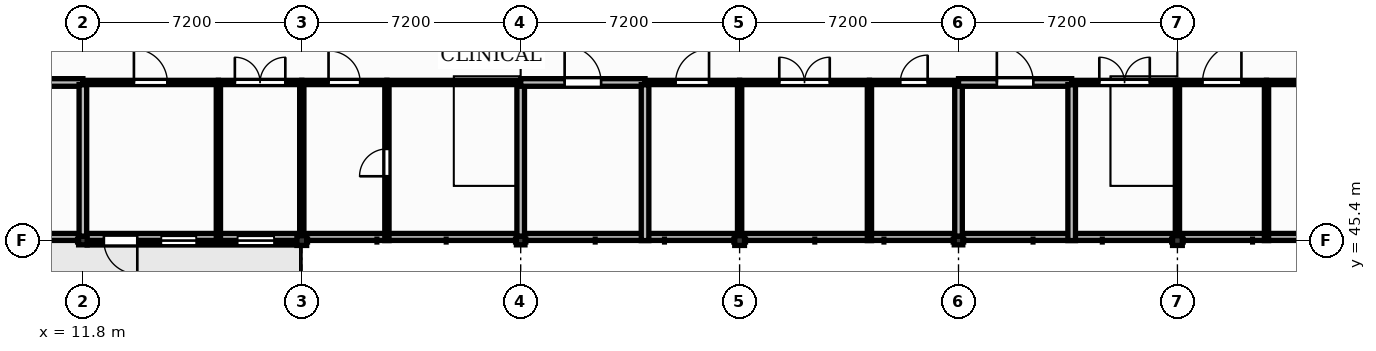
"""IFC4 building model, lengths in metres.
Left out: names, types, materials, properties, quantities, classifications, styles, units other than length and angle.
Written with IfcOpenShell. Run it as: python <this file> out.ifc"""

import sys

from ifc_helpers import new_model, si_unit, direction, frame, frame_2d, origin, origin_2d, place, context, subcontext, project, spatial, polyline, rectangle, outline, extrude, element, fill, save


model = new_model("IFC4")
c1 = context("Model", 3, precision=1e-05, world=origin(), true_north=direction((0.0, 1.0)))
c2 = subcontext(c1, "Body", "Model", "MODEL_VIEW")
j1 = project(units=[si_unit("LENGTHUNIT", "METRE"), si_unit("PLANEANGLEUNIT", "RADIAN")], contexts=[c1])
p1 = place(None, origin())
s1 = spatial("IfcSite", under=j1, at=p1, CompositionType="ELEMENT")
p2 = place(p1, origin())
s2 = spatial("IfcBuilding", under=s1, at=p2, CompositionType="ELEMENT")
p3 = place(p2, frame((0.0, 0.0, 17.4)))
s3 = spatial("IfcBuildingStorey", under=s2, at=p3, CompositionType="ELEMENT", Elevation=17.4)
p4 = place(p3, frame((11.8, 45.4, 0.0), z_axis=(0.0, 0.0, 1.0), x_axis=(1.0, 0.0, 0.0)))
e1 = element("IfcColumn", 1, at=p4, inside=s3, PredefinedType="COLUMN", context=c2, shape_type="SweptSolid", body=[
    extrude(rectangle(XDim=0.28, YDim=0.28, at=origin_2d()), origin(), (0.0, 0.0, 1.0), 3.95),
])
p5 = place(p3, frame((19.0, 45.4, 0.0), z_axis=(0.0, 0.0, 1.0), x_axis=(1.0, 0.0, 0.0)))
e2 = element("IfcColumn", 2, at=p5, inside=s3, PredefinedType="COLUMN", context=c2, shape_type="SweptSolid", body=[
    extrude(rectangle(XDim=0.32, YDim=0.32, at=origin_2d()), origin(), (0.0, 0.0, 1.0), 3.95),
])
p6 = place(p3, frame((26.2, 45.4, 0.0), z_axis=(0.0, 0.0, 1.0), x_axis=(1.0, 0.0, 0.0)))
e3 = element("IfcColumn", 3, at=p6, inside=s3, PredefinedType="COLUMN", context=c2, shape_type="SweptSolid", body=[
    extrude(rectangle(XDim=0.28, YDim=0.28, at=origin_2d()), origin(), (0.0, 0.0, 1.0), 3.95),
])
p7 = place(p3, frame((33.4, 45.4, 0.0), z_axis=(0.0, 0.0, 1.0), x_axis=(1.0, 0.0, 0.0)))
e4 = element("IfcColumn", 4, at=p7, inside=s3, PredefinedType="COLUMN", context=c2, shape_type="SweptSolid", body=[
    extrude(rectangle(XDim=0.32, YDim=0.32, at=origin_2d()), origin(), (0.0, 0.0, 1.0), 3.95),
])
p8 = place(p3, frame((40.6, 45.4, 0.0), z_axis=(0.0, 0.0, 1.0), x_axis=(1.0, 0.0, 0.0)))
e5 = element("IfcColumn", 5, at=p8, inside=s3, PredefinedType="COLUMN", context=c2, shape_type="SweptSolid", body=[
    extrude(rectangle(XDim=0.28, YDim=0.28, at=origin_2d()), origin(), (0.0, 0.0, 1.0), 3.95),
])
p9 = place(p3, frame((47.8, 45.4, 0.0), z_axis=(0.0, 0.0, 1.0), x_axis=(1.0, 0.0, 0.0)))
e6 = element("IfcColumn", 6, at=p9, inside=s3, PredefinedType="COLUMN", context=c2, shape_type="SweptSolid", body=[
    extrude(rectangle(XDim=0.32, YDim=0.32, at=origin_2d()), origin(), (0.0, 0.0, 1.0), 3.95),
])
p10 = place(p3, frame((11.94, 45.4, 0.0), z_axis=(0.0, 0.0, 1.0), x_axis=(1.0, 0.0, 0.0)))
e7 = element("IfcWall", 7, at=p10, inside=s3, PredefinedType="SOLIDWALL", context=c2, shape_type="SweptSolid", body=[
    extrude(rectangle(XDim=6.9, YDim=0.29, at=frame_2d((3.45, 0.0))), origin(), (0.0, 0.0, 1.0), 3.49),
])
p11 = place(p10, frame((0.55, 0.0, 0.0)))
e8 = element("IfcOpeningElement", 8, at=p11, cuts=e7, PredefinedType="OPENING", context=c2, shape_type="SweptSolid", body=[
    extrude(rectangle(XDim=1.1, YDim=2.25, at=frame_2d((0.55, 1.125))), frame((0.0, 0.155, 0.0), z_axis=(0.0, -1.0, 0.0), x_axis=(1.0, 0.0, 0.0)), (0.0, 0.0, 1.0), 0.31),
])
p12 = place(p10, frame((2.438, 0.0, 1.5)))
e9 = element("IfcOpeningElement", 9, at=p12, cuts=e7, PredefinedType="OPENING", context=c2, shape_type="SweptSolid", body=[
    extrude(rectangle(XDim=1.15, YDim=1.25, at=frame_2d((0.575, 0.625))), frame((0.0, 0.155, 0.0), z_axis=(0.0, -1.0, 0.0), x_axis=(1.0, 0.0, 0.0)), (0.0, 0.0, 1.0), 0.31),
])
p13 = place(p10, frame((4.948, 0.0, 1.0)))
e10 = element("IfcOpeningElement", 10, at=p13, cuts=e7, PredefinedType="OPENING", context=c2, shape_type="SweptSolid", body=[
    extrude(rectangle(XDim=1.2, YDim=1.95, at=frame_2d((0.6, 0.975))), frame((0.0, 0.155, 0.0), z_axis=(0.0, -1.0, 0.0), x_axis=(1.0, 0.0, 0.0)), (0.0, 0.0, 1.0), 0.31),
])
p14 = place(p3, frame((4.6, 45.52, 4.2), z_axis=(0.0, 0.0, 1.0), x_axis=(1.0, 0.0, 0.0)))
e11 = element("IfcWall", 11, at=p14, inside=s3, PredefinedType="PARAPET", context=c2, shape_type="SweptSolid", body=[
    extrude(outline(polyline([(0.0, 0.0), (50.4, 0.0), (50.4, 0.6), (39.312, 0.85), (39.312, 0.6), (32.256, 1.1), (32.256, 0.85), (18.144, 1.1), (18.144, 0.85), (11.088, 0.85), (11.088, 0.6), (0.0, 0.6), (0.0, 0.0)])), frame((0.0, 0.115, 0.0), z_axis=(0.0, -1.0, 0.0), x_axis=(1.0, 0.0, 0.0)), (0.0, 0.0, 1.0), 0.23),
])
p15 = place(p3, frame((7.343, 50.6, 0.0), z_axis=(0.0, 0.0, 1.0), x_axis=(1.0, 0.0, 0.0)))
e12 = element("IfcWall", 12, at=p15, inside=s3, PredefinedType="SOLIDWALL", context=c2, shape_type="SweptSolid", body=[
    extrude(rectangle(XDim=4.457, YDim=0.25, at=frame_2d((2.229, 0.0))), origin(), (0.0, 0.0, 1.0), 3.93),
])
p16 = place(p15, frame((1.628, 0.0, 0.0)))
e13 = element("IfcOpeningElement", 13, at=p16, cuts=e12, PredefinedType="OPENING", context=c2, shape_type="SweptSolid", body=[
    extrude(rectangle(XDim=1.2, YDim=2.15, at=frame_2d((0.6, 1.075))), frame((0.0, 0.135, 0.0), z_axis=(0.0, -1.0, 0.0), x_axis=(1.0, 0.0, 0.0)), (0.0, 0.0, 1.0), 0.27),
])
p17 = place(p3, frame((11.8, 45.54, 0.0), z_axis=(0.0, 0.0, 1.0), x_axis=(0.0, 1.0, 0.0)))
e14 = element("IfcWall", 14, at=p17, inside=s3, PredefinedType="SOLIDWALL", context=c2, shape_type="SweptSolid", body=[
    extrude(rectangle(XDim=4.99, YDim=0.25, at=frame_2d((2.495, 0.0))), origin(), (0.0, 0.0, 1.0), 3.49),
])
p18 = place(p3, frame((11.8, 50.6, 0.0), z_axis=(0.0, 0.0, 1.0), x_axis=(1.0, 0.0, 0.0)))
e15 = element("IfcWall", 15, at=p18, inside=s3, PredefinedType="PARTITIONING", context=c2, shape_type="SweptSolid", body=[
    extrude(rectangle(XDim=4.457, YDim=0.14, at=frame_2d((2.229, 0.0))), origin(), (0.0, 0.0, 1.0), 3.93),
])
p19 = place(p18, frame((1.678, 0.0, 0.0)))
e16 = element("IfcOpeningElement", 16, at=p19, cuts=e15, PredefinedType="OPENING", context=c2, shape_type="SweptSolid", body=[
    extrude(rectangle(XDim=1.1, YDim=2.1, at=frame_2d((0.55, 1.05))), frame((0.0, 0.08, 0.0), z_axis=(0.0, -1.0, 0.0), x_axis=(1.0, 0.0, 0.0)), (0.0, 0.0, 1.0), 0.16),
])
p20 = place(p3, frame((16.257, 45.4, 0.0), z_axis=(0.0, 0.0, 1.0), x_axis=(0.0, 1.0, 0.0)))
e17 = element("IfcWall", 17, at=p20, inside=s3, PredefinedType="PARTITIONING", context=c2, shape_type="SweptSolid", body=[
    extrude(rectangle(XDim=5.13, YDim=0.14, at=frame_2d((2.565, 0.0))), origin(), (0.0, 0.0, 1.0), 3.93),
])
p21 = place(p3, frame((16.257, 50.6, 0.0), z_axis=(0.0, 0.0, 1.0), x_axis=(1.0, 0.0, 0.0)))
e18 = element("IfcWall", 18, at=p21, inside=s3, PredefinedType="PARTITIONING", context=c2, shape_type="SweptSolid", body=[
    extrude(rectangle(XDim=2.743, YDim=0.14, at=frame_2d((1.372, 0.0))), origin(), (0.0, 0.0, 1.0), 3.93),
])
p22 = place(p21, frame((0.542, 0.0, 0.0)))
e19 = element("IfcOpeningElement", 19, at=p22, cuts=e18, PredefinedType="OPENING", context=c2, shape_type="SweptSolid", body=[
    extrude(rectangle(XDim=1.66, YDim=2.3, at=frame_2d((0.83, 1.15))), frame((0.0, 0.08, 0.0), z_axis=(0.0, -1.0, 0.0), x_axis=(1.0, 0.0, 0.0)), (0.0, 0.0, 1.0), 0.16),
])
p23 = place(p3, frame((19.0, 45.56, 0.0), z_axis=(0.0, 0.0, 1.0), x_axis=(0.0, 1.0, 0.0)))
e20 = element("IfcWall", 20, at=p23, inside=s3, PredefinedType="PARTITIONING", context=c2, shape_type="SweptSolid", body=[
    extrude(rectangle(XDim=4.97, YDim=0.14, at=frame_2d((2.485, 0.0))), origin(), (0.0, 0.0, 1.0), 3.49),
])
p24 = place(p3, frame((19.0, 50.6, 0.0), z_axis=(0.0, 0.0, 1.0), x_axis=(1.0, 0.0, 0.0)))
e21 = element("IfcWall", 21, at=p24, inside=s3, PredefinedType="PARTITIONING", context=c2, shape_type="SweptSolid", body=[
    extrude(rectangle(XDim=2.8, YDim=0.14, at=frame_2d((1.4, 0.0))), origin(), (0.0, 0.0, 1.0), 3.93),
])
p25 = place(p24, frame((0.88, 0.0, 0.0)))
e22 = element("IfcOpeningElement", 22, at=p25, cuts=e21, PredefinedType="OPENING", context=c2, shape_type="SweptSolid", body=[
    extrude(rectangle(XDim=1.04, YDim=2.1, at=frame_2d((0.52, 1.05))), frame((0.0, 0.08, 0.0), z_axis=(0.0, -1.0, 0.0), x_axis=(1.0, 0.0, 0.0)), (0.0, 0.0, 1.0), 0.16),
])
p26 = place(p3, frame((21.8, 45.4, 0.0), z_axis=(0.0, 0.0, 1.0), x_axis=(0.0, 1.0, 0.0)))
e23 = element("IfcWall", 23, at=p26, inside=s3, PredefinedType="PARTITIONING", context=c2, shape_type="SweptSolid", body=[
    extrude(rectangle(XDim=5.13, YDim=0.14, at=frame_2d((2.565, 0.0))), origin(), (0.0, 0.0, 1.0), 3.93),
])
p27 = place(p26, frame((2.115, 0.0, 0.0)))
e24 = element("IfcOpeningElement", 24, at=p27, cuts=e23, PredefinedType="OPENING", context=c2, shape_type="SweptSolid", body=[
    extrude(rectangle(XDim=0.9, YDim=2.1, at=frame_2d((0.45, 1.05))), frame((0.0, 0.08, 0.0), z_axis=(0.0, -1.0, 0.0), x_axis=(1.0, 0.0, 0.0)), (0.0, 0.0, 1.0), 0.16),
])
p28 = place(p3, frame((21.8, 50.6, 0.0), z_axis=(0.0, 0.0, 1.0), x_axis=(1.0, 0.0, 0.0)))
e25 = element("IfcWall", 25, at=p28, inside=s3, PredefinedType="PARTITIONING", context=c2, shape_type="SweptSolid", body=[
    extrude(rectangle(XDim=4.4, YDim=0.14, at=frame_2d((2.2, 0.0))), origin(), (0.0, 0.0, 1.0), 3.93),
])
p29 = place(p3, frame((26.2, 45.54, 0.0), z_axis=(0.0, 0.0, 1.0), x_axis=(0.0, 1.0, 0.0)))
e26 = element("IfcWall", 26, at=p29, inside=s3, PredefinedType="SOLIDWALL", context=c2, shape_type="SweptSolid", body=[
    extrude(rectangle(XDim=4.99, YDim=0.25, at=frame_2d((2.495, 0.0))), origin(), (0.0, 0.0, 1.0), 3.49),
])
p30 = place(p3, frame((26.2, 50.6, 0.0), z_axis=(0.0, 0.0, 1.0), x_axis=(1.0, 0.0, 0.0)))
e27 = element("IfcWall", 27, at=p30, inside=s3, PredefinedType="SOLIDWALL", context=c2, shape_type="SweptSolid", body=[
    extrude(rectangle(XDim=4.09, YDim=0.25, at=frame_2d((2.045, 0.0))), origin(), (0.0, 0.0, 1.0), 3.93),
])
p31 = place(p30, frame((1.445, 0.0, 0.0)))
e28 = element("IfcOpeningElement", 28, at=p31, cuts=e27, PredefinedType="OPENING", context=c2, shape_type="SweptSolid", body=[
    extrude(rectangle(XDim=1.2, YDim=2.15, at=frame_2d((0.6, 1.075))), frame((0.0, 0.135, 0.0), z_axis=(0.0, -1.0, 0.0), x_axis=(1.0, 0.0, 0.0)), (0.0, 0.0, 1.0), 0.27),
])
p32 = place(p3, frame((30.29, 45.4, 0.0), z_axis=(0.0, 0.0, 1.0), x_axis=(0.0, 1.0, 0.0)))
e29 = element("IfcWall", 29, at=p32, inside=s3, PredefinedType="SOLIDWALL", context=c2, shape_type="SweptSolid", body=[
    extrude(rectangle(XDim=5.13, YDim=0.25, at=frame_2d((2.565, 0.0))), origin(), (0.0, 0.0, 1.0), 3.93),
])
p33 = place(p3, frame((30.29, 50.6, 0.0), z_axis=(0.0, 0.0, 1.0), x_axis=(1.0, 0.0, 0.0)))
e30 = element("IfcWall", 30, at=p33, inside=s3, PredefinedType="PARTITIONING", context=c2, shape_type="SweptSolid", body=[
    extrude(rectangle(XDim=3.11, YDim=0.14, at=frame_2d((1.555, 0.0))), origin(), (0.0, 0.0, 1.0), 3.93),
])
p34 = place(p33, frame((1.005, 0.0, 0.0)))
e31 = element("IfcOpeningElement", 31, at=p34, cuts=e30, PredefinedType="OPENING", context=c2, shape_type="SweptSolid", body=[
    extrude(rectangle(XDim=1.1, YDim=2.1, at=frame_2d((0.55, 1.05))), frame((0.0, 0.08, 0.0), z_axis=(0.0, -1.0, 0.0), x_axis=(1.0, 0.0, 0.0)), (0.0, 0.0, 1.0), 0.16),
])
p35 = place(p3, frame((33.4, 45.56, 0.0), z_axis=(0.0, 0.0, 1.0), x_axis=(0.0, 1.0, 0.0)))
e32 = element("IfcWall", 32, at=p35, inside=s3, PredefinedType="PARTITIONING", context=c2, shape_type="SweptSolid", body=[
    extrude(rectangle(XDim=4.97, YDim=0.14, at=frame_2d((2.485, 0.0))), origin(), (0.0, 0.0, 1.0), 3.49),
])
p36 = place(p3, frame((33.4, 50.6, 0.0), z_axis=(0.0, 0.0, 1.0), x_axis=(1.0, 0.0, 0.0)))
e33 = element("IfcWall", 33, at=p36, inside=s3, PredefinedType="PARTITIONING", context=c2, shape_type="SweptSolid", body=[
    extrude(rectangle(XDim=4.27, YDim=0.14, at=frame_2d((2.135, 0.0))), origin(), (0.0, 0.0, 1.0), 3.93),
])
p37 = place(p36, frame((1.305, 0.0, 0.0)))
e34 = element("IfcOpeningElement", 34, at=p37, cuts=e33, PredefinedType="OPENING", context=c2, shape_type="SweptSolid", body=[
    extrude(rectangle(XDim=1.66, YDim=2.3, at=frame_2d((0.83, 1.15))), frame((0.0, 0.08, 0.0), z_axis=(0.0, -1.0, 0.0), x_axis=(1.0, 0.0, 0.0)), (0.0, 0.0, 1.0), 0.16),
])
p38 = place(p3, frame((37.67, 45.4, 0.0), z_axis=(0.0, 0.0, 1.0), x_axis=(0.0, 1.0, 0.0)))
e35 = element("IfcWall", 35, at=p38, inside=s3, PredefinedType="PARTITIONING", context=c2, shape_type="SweptSolid", body=[
    extrude(rectangle(XDim=5.13, YDim=0.14, at=frame_2d((2.565, 0.0))), origin(), (0.0, 0.0, 1.0), 3.93),
])
p39 = place(p3, frame((37.67, 50.6, 0.0), z_axis=(0.0, 0.0, 1.0), x_axis=(1.0, 0.0, 0.0)))
e36 = element("IfcWall", 36, at=p39, inside=s3, PredefinedType="PARTITIONING", context=c2, shape_type="SweptSolid", body=[
    extrude(rectangle(XDim=2.93, YDim=0.14, at=frame_2d((1.465, 0.0))), origin(), (0.0, 0.0, 1.0), 3.93),
])
p40 = place(p39, frame((1.015, 0.0, 0.0)))
e37 = element("IfcOpeningElement", 37, at=p40, cuts=e36, PredefinedType="OPENING", context=c2, shape_type="SweptSolid", body=[
    extrude(rectangle(XDim=0.9, YDim=2.1, at=frame_2d((0.45, 1.05))), frame((0.0, 0.08, 0.0), z_axis=(0.0, -1.0, 0.0), x_axis=(1.0, 0.0, 0.0)), (0.0, 0.0, 1.0), 0.16),
])
p41 = place(p3, frame((40.6, 45.54, 0.0), z_axis=(0.0, 0.0, 1.0), x_axis=(0.0, 1.0, 0.0)))
e38 = element("IfcWall", 38, at=p41, inside=s3, PredefinedType="SOLIDWALL", context=c2, shape_type="SweptSolid", body=[
    extrude(rectangle(XDim=4.99, YDim=0.25, at=frame_2d((2.495, 0.0))), origin(), (0.0, 0.0, 1.0), 3.49),
])
p42 = place(p3, frame((40.6, 50.6, 0.0), z_axis=(0.0, 0.0, 1.0), x_axis=(1.0, 0.0, 0.0)))
e39 = element("IfcWall", 39, at=p42, inside=s3, PredefinedType="SOLIDWALL", context=c2, shape_type="SweptSolid", body=[
    extrude(rectangle(XDim=3.722, YDim=0.25, at=frame_2d((1.861, 0.0))), origin(), (0.0, 0.0, 1.0), 3.93),
])
p43 = place(p42, frame((1.261, 0.0, 0.0)))
e40 = element("IfcOpeningElement", 40, at=p43, cuts=e39, PredefinedType="OPENING", context=c2, shape_type="SweptSolid", body=[
    extrude(rectangle(XDim=1.2, YDim=2.15, at=frame_2d((0.6, 1.075))), frame((0.0, 0.135, 0.0), z_axis=(0.0, -1.0, 0.0), x_axis=(1.0, 0.0, 0.0)), (0.0, 0.0, 1.0), 0.27),
])
p44 = place(p3, frame((44.322, 45.4, 0.0), z_axis=(0.0, 0.0, 1.0), x_axis=(0.0, 1.0, 0.0)))
e41 = element("IfcWall", 41, at=p44, inside=s3, PredefinedType="SOLIDWALL", context=c2, shape_type="SweptSolid", body=[
    extrude(rectangle(XDim=5.13, YDim=0.25, at=frame_2d((2.565, 0.0))), origin(), (0.0, 0.0, 1.0), 3.93),
])
p45 = place(p3, frame((44.322, 50.6, 0.0), z_axis=(0.0, 0.0, 1.0), x_axis=(1.0, 0.0, 0.0)))
e42 = element("IfcWall", 42, at=p45, inside=s3, PredefinedType="PARTITIONING", context=c2, shape_type="SweptSolid", body=[
    extrude(rectangle(XDim=3.478, YDim=0.14, at=frame_2d((1.739, 0.0))), origin(), (0.0, 0.0, 1.0), 3.93),
])
p46 = place(p45, frame((0.909, 0.0, 0.0)))
e43 = element("IfcOpeningElement", 43, at=p46, cuts=e42, PredefinedType="OPENING", context=c2, shape_type="SweptSolid", body=[
    extrude(rectangle(XDim=1.66, YDim=2.3, at=frame_2d((0.83, 1.15))), frame((0.0, 0.08, 0.0), z_axis=(0.0, -1.0, 0.0), x_axis=(1.0, 0.0, 0.0)), (0.0, 0.0, 1.0), 0.16),
])
p47 = place(p3, frame((47.8, 45.56, 0.0), z_axis=(0.0, 0.0, 1.0), x_axis=(0.0, 1.0, 0.0)))
e44 = element("IfcWall", 44, at=p47, inside=s3, PredefinedType="PARTITIONING", context=c2, shape_type="SweptSolid", body=[
    extrude(rectangle(XDim=4.97, YDim=0.14, at=frame_2d((2.485, 0.0))), origin(), (0.0, 0.0, 1.0), 3.49),
])
p48 = place(p3, frame((47.8, 50.6, 0.0), z_axis=(0.0, 0.0, 1.0), x_axis=(1.0, 0.0, 0.0)))
e45 = element("IfcWall", 45, at=p48, inside=s3, PredefinedType="PARTITIONING", context=c2, shape_type="SweptSolid", body=[
    extrude(rectangle(XDim=2.93, YDim=0.14, at=frame_2d((1.465, 0.0))), origin(), (0.0, 0.0, 1.0), 3.93),
])
p49 = place(p48, frame((0.825, 0.0, 0.0)))
e46 = element("IfcOpeningElement", 46, at=p49, cuts=e45, PredefinedType="OPENING", context=c2, shape_type="SweptSolid", body=[
    extrude(rectangle(XDim=1.28, YDim=2.2, at=frame_2d((0.64, 1.1))), frame((0.0, 0.08, 0.0), z_axis=(0.0, -1.0, 0.0), x_axis=(1.0, 0.0, 0.0)), (0.0, 0.0, 1.0), 0.16),
])
p50 = place(p3, frame((50.73, 45.4, 0.0), z_axis=(0.0, 0.0, 1.0), x_axis=(0.0, 1.0, 0.0)))
e47 = element("IfcWall", 47, at=p50, inside=s3, PredefinedType="PARTITIONING", context=c2, shape_type="SweptSolid", body=[
    extrude(rectangle(XDim=5.13, YDim=0.14, at=frame_2d((2.565, 0.0))), origin(), (0.0, 0.0, 1.0), 3.93),
])
p51 = place(p3, frame((50.73, 50.6, 0.0), z_axis=(0.0, 0.0, 1.0), x_axis=(1.0, 0.0, 0.0)))
e48 = element("IfcWall", 48, at=p51, inside=s3, PredefinedType="PARTITIONING", context=c2, shape_type="SweptSolid", body=[
    extrude(rectangle(XDim=4.27, YDim=0.14, at=frame_2d((2.135, 0.0))), origin(), (0.0, 0.0, 1.0), 3.93),
])
p52 = place(p51, frame((1.685, 0.0, 0.0)))
e49 = element("IfcOpeningElement", 49, at=p52, cuts=e48, PredefinedType="OPENING", context=c2, shape_type="SweptSolid", body=[
    extrude(rectangle(XDim=0.9, YDim=2.1, at=frame_2d((0.45, 1.05))), frame((0.0, 0.08, 0.0), z_axis=(0.0, -1.0, 0.0), x_axis=(1.0, 0.0, 0.0)), (0.0, 0.0, 1.0), 0.16),
])
p53 = place(p11, frame((1.1, 0.0, 0.0), z_axis=(0.0, 0.0, 1.0), x_axis=(-1.0, 0.0, 0.0)))
e50 = element("IfcDoor", 50, at=p53, inside=s3, OperationType="SINGLE_SWING_LEFT", PredefinedType="DOOR", context=c2, shape_type="SweptSolid", body=[
    extrude(rectangle(XDim=1.1, YDim=2.25, at=frame_2d((0.55, 1.125))), frame((0.0, 0.025, 0.0), z_axis=(0.0, -1.0, 0.0), x_axis=(1.0, 0.0, 0.0)), (0.0, 0.0, 1.0), 0.05),
])
fill(e8, e50)
p54 = place(p12, origin())
e51 = element("IfcWindow", 51, at=p54, inside=s3, PartitioningType="SINGLE_PANEL", PredefinedType="WINDOW", context=c2, shape_type="SweptSolid", body=[
    extrude(rectangle(XDim=1.15, YDim=1.25, at=frame_2d((0.575, 0.625))), frame((0.0, 0.03, 0.0), z_axis=(0.0, -1.0, 0.0), x_axis=(1.0, 0.0, 0.0)), (0.0, 0.0, 1.0), 0.06),
])
fill(e9, e51)
p55 = place(p13, origin())
e52 = element("IfcWindow", 52, at=p55, inside=s3, PartitioningType="SINGLE_PANEL", PredefinedType="WINDOW", context=c2, shape_type="SweptSolid", body=[
    extrude(rectangle(XDim=1.2, YDim=1.95, at=frame_2d((0.6, 0.975))), frame((0.0, 0.03, 0.0), z_axis=(0.0, -1.0, 0.0), x_axis=(1.0, 0.0, 0.0)), (0.0, 0.0, 1.0), 0.06),
])
fill(e10, e52)
p56 = place(p25, origin())
e53 = element("IfcDoor", 53, at=p56, inside=s3, OperationType="SINGLE_SWING_LEFT", PredefinedType="DOOR", context=c2, shape_type="SweptSolid", body=[
    extrude(rectangle(XDim=1.04, YDim=2.1, at=frame_2d((0.52, 1.05))), frame((0.0, 0.025, 0.0), z_axis=(0.0, -1.0, 0.0), x_axis=(1.0, 0.0, 0.0)), (0.0, 0.0, 1.0), 0.05),
])
fill(e22, e53)
p57 = place(p19, origin())
e54 = element("IfcDoor", 54, at=p57, inside=s3, OperationType="SINGLE_SWING_LEFT", PredefinedType="DOOR", context=c2, shape_type="SweptSolid", body=[
    extrude(rectangle(XDim=1.1, YDim=2.1, at=frame_2d((0.55, 1.05))), frame((0.0, 0.025, 0.0), z_axis=(0.0, -1.0, 0.0), x_axis=(1.0, 0.0, 0.0)), (0.0, 0.0, 1.0), 0.05),
])
fill(e16, e54)
p58 = place(p22, origin())
e55 = element("IfcDoor", 55, at=p58, inside=s3, OperationType="DOUBLE_DOOR_SINGLE_SWING", PredefinedType="DOOR", context=c2, shape_type="SweptSolid", body=[
    extrude(rectangle(XDim=1.66, YDim=2.3, at=frame_2d((0.83, 1.15))), frame((0.0, 0.025, 0.0), z_axis=(0.0, -1.0, 0.0), x_axis=(1.0, 0.0, 0.0)), (0.0, 0.0, 1.0), 0.05),
])
fill(e19, e55)
p59 = place(p27, origin())
e56 = element("IfcDoor", 56, at=p59, inside=s3, OperationType="SINGLE_SWING_LEFT", PredefinedType="DOOR", context=c2, shape_type="SweptSolid", body=[
    extrude(rectangle(XDim=0.9, YDim=2.1, at=frame_2d((0.45, 1.05))), frame((0.0, 0.025, 0.0), z_axis=(0.0, -1.0, 0.0), x_axis=(1.0, 0.0, 0.0)), (0.0, 0.0, 1.0), 0.05),
])
fill(e24, e56)
p60 = place(p31, origin())
e57 = element("IfcDoor", 57, at=p60, inside=s3, OperationType="SINGLE_SWING_LEFT", PredefinedType="DOOR", context=c2, shape_type="SweptSolid", body=[
    extrude(rectangle(XDim=1.2, YDim=2.15, at=frame_2d((0.6, 1.075))), frame((0.0, 0.025, 0.0), z_axis=(0.0, -1.0, 0.0), x_axis=(1.0, 0.0, 0.0)), (0.0, 0.0, 1.0), 0.05),
])
fill(e28, e57)
p61 = place(p34, origin())
e58 = element("IfcDoor", 58, at=p61, inside=s3, OperationType="SINGLE_SWING_RIGHT", PredefinedType="DOOR", context=c2, shape_type="SweptSolid", body=[
    extrude(rectangle(XDim=1.1, YDim=2.1, at=frame_2d((0.55, 1.05))), frame((0.0, 0.025, 0.0), z_axis=(0.0, -1.0, 0.0), x_axis=(1.0, 0.0, 0.0)), (0.0, 0.0, 1.0), 0.05),
])
fill(e31, e58)
p62 = place(p37, origin())
e59 = element("IfcDoor", 59, at=p62, inside=s3, OperationType="DOUBLE_DOOR_SINGLE_SWING", PredefinedType="DOOR", context=c2, shape_type="SweptSolid", body=[
    extrude(rectangle(XDim=1.66, YDim=2.3, at=frame_2d((0.83, 1.15))), frame((0.0, 0.025, 0.0), z_axis=(0.0, -1.0, 0.0), x_axis=(1.0, 0.0, 0.0)), (0.0, 0.0, 1.0), 0.05),
])
fill(e34, e59)
p63 = place(p40, origin())
e60 = element("IfcDoor", 60, at=p63, inside=s3, OperationType="SINGLE_SWING_RIGHT", PredefinedType="DOOR", context=c2, shape_type="SweptSolid", body=[
    extrude(rectangle(XDim=0.9, YDim=2.1, at=frame_2d((0.45, 1.05))), frame((0.0, 0.025, 0.0), z_axis=(0.0, -1.0, 0.0), x_axis=(1.0, 0.0, 0.0)), (0.0, 0.0, 1.0), 0.05),
])
fill(e37, e60)
p64 = place(p43, origin())
e61 = element("IfcDoor", 61, at=p64, inside=s3, OperationType="SINGLE_SWING_LEFT", PredefinedType="DOOR", context=c2, shape_type="SweptSolid", body=[
    extrude(rectangle(XDim=1.2, YDim=2.15, at=frame_2d((0.6, 1.075))), frame((0.0, 0.025, 0.0), z_axis=(0.0, -1.0, 0.0), x_axis=(1.0, 0.0, 0.0)), (0.0, 0.0, 1.0), 0.05),
])
fill(e40, e61)
p65 = place(p46, origin())
e62 = element("IfcDoor", 62, at=p65, inside=s3, OperationType="DOUBLE_DOOR_SINGLE_SWING", PredefinedType="DOOR", context=c2, shape_type="SweptSolid", body=[
    extrude(rectangle(XDim=1.66, YDim=2.3, at=frame_2d((0.83, 1.15))), frame((0.0, 0.025, 0.0), z_axis=(0.0, -1.0, 0.0), x_axis=(1.0, 0.0, 0.0)), (0.0, 0.0, 1.0), 0.05),
])
fill(e43, e62)
p66 = place(p49, origin())
e63 = element("IfcDoor", 63, at=p66, inside=s3, OperationType="SINGLE_SWING_RIGHT", PredefinedType="DOOR", context=c2, shape_type="SweptSolid", body=[
    extrude(rectangle(XDim=1.28, YDim=2.2, at=frame_2d((0.64, 1.1))), frame((0.0, 0.025, 0.0), z_axis=(0.0, -1.0, 0.0), x_axis=(1.0, 0.0, 0.0)), (0.0, 0.0, 1.0), 0.05),
])
fill(e46, e63)
save(model, sys.argv[1])
